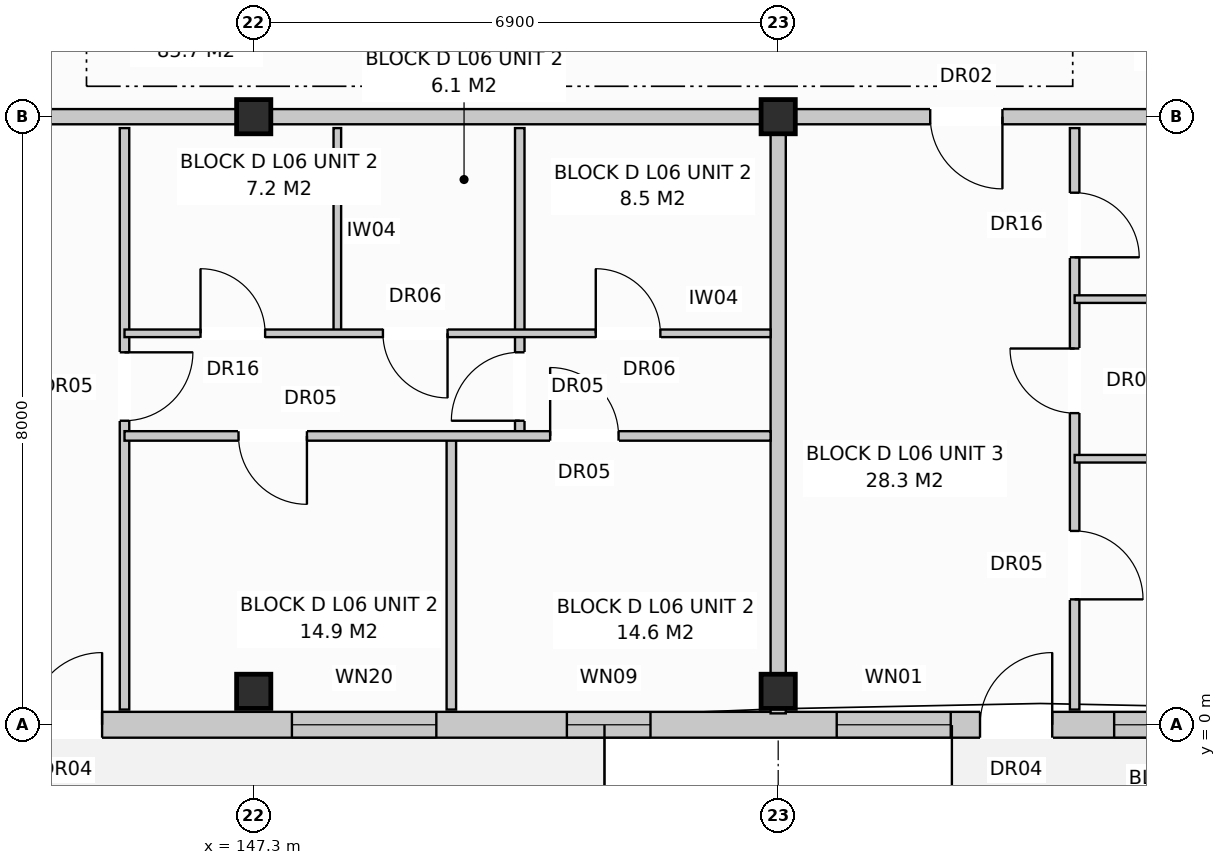
"""IFC4 building model, lengths in metres.
Left out: names, types, materials, properties, quantities, classifications, styles, units other than length and angle.
Written with IfcOpenShell. Run it as: python <this file> out.ifc"""

import sys

from ifc_helpers import new_model, si_unit, direction, frame, frame_2d, origin, origin_with_axes, origin_2d, place, context, subcontext, project, spatial, rectangle, extrude, element, fill, save


model = new_model("IFC4")
c1 = context("Model", 3, precision=1e-05, world=origin(), true_north=direction((0.0, 1.0)))
c2 = subcontext(c1, "Body", "Model", "MODEL_VIEW")
j1 = project(units=[si_unit("LENGTHUNIT", "METRE"), si_unit("PLANEANGLEUNIT", "RADIAN")], contexts=[c1])
p1 = place(None, origin())
s1 = spatial("IfcSite", under=j1, at=p1, CompositionType="ELEMENT")
p2 = place(p1, origin())
s2 = spatial("IfcBuilding", under=s1, at=p2, CompositionType="ELEMENT")
p3 = place(p2, frame((0.0, 0.0, 20.8)))
s3 = spatial("IfcBuildingStorey", under=s2, at=p3, CompositionType="ELEMENT", Elevation=20.8)
for number, where, z_axis, x_axis in (
    (1, (147.3, 0.44, 0.0), (0.0, 0.0, 1.0), (1.0, 0.0, 0.0)),
    (2, (147.3, 8.0, 0.0), (0.0, 0.0, 1.0), (1.0, 0.0, 0.0)),
    (3, (154.2, 0.44, 0.0), (0.0, 0.0, 1.0), (1.0, 0.0, 0.0)),
    (4, (154.2, 8.0, 0.0), (0.0, 0.0, 1.0), (1.0, 0.0, 0.0)),
):
    element("IfcColumn", number, at=place(p3, frame(where, z_axis=z_axis, x_axis=x_axis)), inside=s3, PredefinedType="COLUMN", context=c2, shape_type="SweptSolid", body=[
        extrude(rectangle(XDim=0.45, YDim=0.45, at=origin_2d()), origin(), (0.0, 0.0, 1.0), 3.2),
    ])
p4 = place(p3, frame((126.76, 0.0, 0.0), z_axis=(0.0, 0.0, 1.0), x_axis=(1.0, 0.0, 0.0)))
e5 = element("IfcWall", 5, at=p4, inside=s3, PredefinedType="STANDARD", context=c2, shape_type="SweptSolid", body=[
    extrude(rectangle(XDim=41.08, YDim=0.34, at=frame_2d((20.54, 0.0))), origin(), (0.0, 0.0, 1.0), 2.95),
])
p5 = place(p4, frame((2.795, 0.0, 0.0)))
e6 = element("IfcOpeningElement", 6, at=p5, cuts=e5, PredefinedType="OPENING", context=c2, shape_type="SweptSolid", body=[
    extrude(rectangle(XDim=0.95, YDim=2.1, at=frame_2d((0.475, 1.05))), frame((0.0, 0.182, 0.0), z_axis=(0.0, -1.0, 0.0), x_axis=(1.0, 0.0, 0.0)), (0.0, 0.0, 1.0), 0.364),
])
p6 = place(p4, frame((17.595, 0.0, 0.0)))
e7 = element("IfcOpeningElement", 7, at=p6, cuts=e5, PredefinedType="OPENING", context=c2, shape_type="SweptSolid", body=[
    extrude(rectangle(XDim=0.95, YDim=2.1, at=frame_2d((0.475, 1.05))), frame((0.0, 0.182, 0.0), z_axis=(0.0, -1.0, 0.0), x_axis=(1.0, 0.0, 0.0)), (0.0, 0.0, 1.0), 0.364),
])
p7 = place(p4, frame((30.095, 0.0, 0.0)))
e8 = element("IfcOpeningElement", 8, at=p7, cuts=e5, PredefinedType="OPENING", context=c2, shape_type="SweptSolid", body=[
    extrude(rectangle(XDim=0.95, YDim=2.1, at=frame_2d((0.475, 1.05))), frame((0.0, 0.182, 0.0), z_axis=(0.0, -1.0, 0.0), x_axis=(1.0, 0.0, 0.0)), (0.0, 0.0, 1.0), 0.364),
])
p8 = place(p4, frame((0.63, 0.0, 0.8)))
e9 = element("IfcOpeningElement", 9, at=p8, cuts=e5, PredefinedType="OPENING", context=c2, shape_type="SweptSolid", body=[
    extrude(rectangle(XDim=1.8, YDim=1.7, at=frame_2d((0.9, 0.85))), frame((0.0, 0.182, 0.0), z_axis=(0.0, -1.0, 0.0), x_axis=(1.0, 0.0, 0.0)), (0.0, 0.0, 1.0), 0.364),
])
p9 = place(p4, frame((4.36, 0.0, 0.72)))
e10 = element("IfcOpeningElement", 10, at=p9, cuts=e5, PredefinedType="OPENING", context=c2, shape_type="SweptSolid", body=[
    extrude(rectangle(XDim=1.9, YDim=1.85, at=frame_2d((0.95, 0.925))), frame((0.0, 0.182, 0.0), z_axis=(0.0, -1.0, 0.0), x_axis=(1.0, 0.0, 0.0)), (0.0, 0.0, 1.0), 0.364),
])
p10 = place(p4, frame((10.46, 0.0, 0.72)))
e11 = element("IfcOpeningElement", 11, at=p10, cuts=e5, PredefinedType="OPENING", context=c2, shape_type="SweptSolid", body=[
    extrude(rectangle(XDim=1.1, YDim=1.5, at=frame_2d((0.55, 0.75))), frame((0.0, 0.182, 0.0), z_axis=(0.0, -1.0, 0.0), x_axis=(1.0, 0.0, 0.0)), (0.0, 0.0, 1.0), 0.364),
])
p11 = place(p4, frame((15.76, 0.0, 0.72)))
e12 = element("IfcOpeningElement", 12, at=p11, cuts=e5, PredefinedType="OPENING", context=c2, shape_type="SweptSolid", body=[
    extrude(rectangle(XDim=1.1, YDim=1.5, at=frame_2d((0.55, 0.75))), frame((0.0, 0.182, 0.0), z_axis=(0.0, -1.0, 0.0), x_axis=(1.0, 0.0, 0.0)), (0.0, 0.0, 1.0), 0.364),
])
p12 = place(p4, frame((21.042, 0.0, 0.72)))
e13 = element("IfcOpeningElement", 13, at=p12, cuts=e5, PredefinedType="OPENING", context=c2, shape_type="SweptSolid", body=[
    extrude(rectangle(XDim=1.9, YDim=1.85, at=frame_2d((0.95, 0.925))), frame((0.0, 0.182, 0.0), z_axis=(0.0, -1.0, 0.0), x_axis=(1.0, 0.0, 0.0)), (0.0, 0.0, 1.0), 0.364),
])
p13 = place(p4, frame((24.66, 0.0, 0.72)))
e14 = element("IfcOpeningElement", 14, at=p13, cuts=e5, PredefinedType="OPENING", context=c2, shape_type="SweptSolid", body=[
    extrude(rectangle(XDim=1.1, YDim=1.5, at=frame_2d((0.55, 0.75))), frame((0.0, 0.182, 0.0), z_axis=(0.0, -1.0, 0.0), x_axis=(1.0, 0.0, 0.0)), (0.0, 0.0, 1.0), 0.364),
])
p14 = place(p4, frame((28.21, 0.0, 0.85)))
e15 = element("IfcOpeningElement", 15, at=p14, cuts=e5, PredefinedType="OPENING", context=c2, shape_type="SweptSolid", body=[
    extrude(rectangle(XDim=1.5, YDim=1.65, at=frame_2d((0.75, 0.825))), frame((0.0, 0.182, 0.0), z_axis=(0.0, -1.0, 0.0), x_axis=(1.0, 0.0, 0.0)), (0.0, 0.0, 1.0), 0.364),
])
p15 = place(p4, frame((31.86, 0.0, 0.72)))
e16 = element("IfcOpeningElement", 16, at=p15, cuts=e5, PredefinedType="OPENING", context=c2, shape_type="SweptSolid", body=[
    extrude(rectangle(XDim=1.9, YDim=1.85, at=frame_2d((0.95, 0.925))), frame((0.0, 0.182, 0.0), z_axis=(0.0, -1.0, 0.0), x_axis=(1.0, 0.0, 0.0)), (0.0, 0.0, 1.0), 0.364),
])
p16 = place(p4, frame((35.335, 0.0, 0.8)))
e17 = element("IfcOpeningElement", 17, at=p16, cuts=e5, PredefinedType="OPENING", context=c2, shape_type="SweptSolid", body=[
    extrude(rectangle(XDim=1.95, YDim=1.65, at=frame_2d((0.975, 0.825))), frame((0.0, 0.182, 0.0), z_axis=(0.0, -1.0, 0.0), x_axis=(1.0, 0.0, 0.0)), (0.0, 0.0, 1.0), 0.364),
])
p17 = place(p4, frame((38.65, 0.0, 0.8)))
e18 = element("IfcOpeningElement", 18, at=p17, cuts=e5, PredefinedType="OPENING", context=c2, shape_type="SweptSolid", body=[
    extrude(rectangle(XDim=1.8, YDim=1.7, at=frame_2d((0.9, 0.85))), frame((0.0, 0.182, 0.0), z_axis=(0.0, -1.0, 0.0), x_axis=(1.0, 0.0, 0.0)), (0.0, 0.0, 1.0), 0.364),
])
p18 = place(p3, frame((154.2, 7.85, 0.0), z_axis=(0.0, 0.0, 1.0), x_axis=(0.0, -1.0, 0.0)))
e19 = element("IfcWall", 19, at=p18, inside=s3, PredefinedType="PARTITIONING", context=c2, shape_type="SweptSolid", body=[
    extrude(rectangle(XDim=7.7, YDim=0.2, at=frame_2d((3.85, 0.0))), origin(), (0.0, 0.0, 1.0), 2.95),
])
p19 = place(p3, frame((140.4, 8.0, 0.0), z_axis=(0.0, 0.0, 1.0), x_axis=(1.0, 0.0, 0.0)))
e20 = element("IfcWall", 20, at=p19, inside=s3, PredefinedType="PARTITIONING", context=c2, shape_type="SweptSolid", body=[
    extrude(rectangle(XDim=13.8, YDim=0.2, at=frame_2d((6.9, 0.0))), origin(), (0.0, 0.0, 1.0), 2.39),
])
p20 = place(p19, frame((2.4, 0.0, 0.0)))
e21 = element("IfcOpeningElement", 21, at=p20, cuts=e20, PredefinedType="OPENING", context=c2, shape_type="SweptSolid", body=[
    extrude(rectangle(XDim=0.95, YDim=2.15, at=frame_2d((0.475, 1.075))), frame((0.0, 0.112, 0.0), z_axis=(0.0, -1.0, 0.0), x_axis=(1.0, 0.0, 0.0)), (0.0, 0.0, 1.0), 0.224),
])
p21 = place(p3, frame((145.6, 7.85, 0.0), z_axis=(0.0, 0.0, 1.0), x_axis=(0.0, -1.0, 0.0)))
e22 = element("IfcWall", 22, at=p21, inside=s3, PredefinedType="PARTITIONING", context=c2, shape_type="SweptSolid", body=[
    extrude(rectangle(XDim=7.65, YDim=0.125, at=frame_2d((3.825, 0.0))), origin(), (0.0, 0.0, 1.0), 2.95),
])
p22 = place(p21, frame((2.95, 0.0, 0.0)))
e23 = element("IfcOpeningElement", 23, at=p22, cuts=e22, PredefinedType="OPENING", context=c2, shape_type="SweptSolid", body=[
    extrude(rectangle(XDim=0.9, YDim=2.1, at=frame_2d((0.45, 1.05))), frame((0.0, 0.074, 0.0), z_axis=(0.0, -1.0, 0.0), x_axis=(1.0, 0.0, 0.0)), (0.0, 0.0, 1.0), 0.149),
])
p23 = place(p3, frame((148.4, 7.85, 0.0), z_axis=(0.0, 0.0, 1.0), x_axis=(0.0, -1.0, 0.0)))
e24 = element("IfcWall", 24, at=p23, inside=s3, PredefinedType="PARTITIONING", context=c2, shape_type="SweptSolid", body=[
    extrude(rectangle(XDim=2.7, YDim=0.1, at=frame_2d((1.35, 0.0))), origin(), (0.0, 0.0, 1.0), 2.95),
])
p24 = place(p3, frame((150.8, 7.85, 0.0), z_axis=(0.0, 0.0, 1.0), x_axis=(0.0, -1.0, 0.0)))
e25 = element("IfcWall", 25, at=p24, inside=s3, PredefinedType="PARTITIONING", context=c2, shape_type="SweptSolid", body=[
    extrude(rectangle(XDim=4.05, YDim=0.125, at=frame_2d((2.025, 0.0))), origin(), (0.0, 0.0, 1.0), 2.59),
])
p25 = place(p24, frame((2.95, 0.0, 0.0)))
e26 = element("IfcOpeningElement", 26, at=p25, cuts=e25, PredefinedType="OPENING", context=c2, shape_type="SweptSolid", body=[
    extrude(rectangle(XDim=0.9, YDim=2.1, at=frame_2d((0.45, 1.05))), frame((0.0, 0.074, 0.0), z_axis=(0.0, -1.0, 0.0), x_axis=(1.0, 0.0, 0.0)), (0.0, 0.0, 1.0), 0.149),
])
p26 = place(p3, frame((149.9, 3.8, 0.0), z_axis=(0.0, 0.0, 1.0), x_axis=(0.0, -1.0, 0.0)))
e27 = element("IfcWall", 27, at=p26, inside=s3, PredefinedType="PARTITIONING", context=c2, shape_type="SweptSolid", body=[
    extrude(rectangle(XDim=3.6, YDim=0.125, at=frame_2d((1.8, 0.0))), origin(), (0.0, 0.0, 1.0), 2.95),
])
p27 = place(p3, frame((145.6, 5.15, 0.0), z_axis=(0.0, 0.0, 1.0), x_axis=(1.0, 0.0, 0.0)))
e28 = element("IfcWall", 28, at=p27, inside=s3, PredefinedType="PARTITIONING", context=c2, shape_type="SweptSolid", body=[
    extrude(rectangle(XDim=8.5, YDim=0.1, at=frame_2d((4.25, 0.0))), origin(), (0.0, 0.0, 1.0), 2.95),
])
p28 = place(p27, frame((1.0, 0.0, 0.0)))
e29 = element("IfcOpeningElement", 29, at=p28, cuts=e28, PredefinedType="OPENING", context=c2, shape_type="SweptSolid", body=[
    extrude(rectangle(XDim=0.85, YDim=2.1, at=frame_2d((0.425, 1.05))), frame((0.0, 0.062, 0.0), z_axis=(0.0, -1.0, 0.0), x_axis=(1.0, 0.0, 0.0)), (0.0, 0.0, 1.0), 0.124),
])
p29 = place(p27, frame((3.4, 0.0, 0.0)))
e30 = element("IfcOpeningElement", 30, at=p29, cuts=e28, PredefinedType="OPENING", context=c2, shape_type="SweptSolid", body=[
    extrude(rectangle(XDim=0.85, YDim=2.05, at=frame_2d((0.425, 1.025))), frame((0.0, 0.062, 0.0), z_axis=(0.0, -1.0, 0.0), x_axis=(1.0, 0.0, 0.0)), (0.0, 0.0, 1.0), 0.124),
])
p30 = place(p27, frame((6.2, 0.0, 0.0)))
e31 = element("IfcOpeningElement", 31, at=p30, cuts=e28, PredefinedType="OPENING", context=c2, shape_type="SweptSolid", body=[
    extrude(rectangle(XDim=0.85, YDim=2.05, at=frame_2d((0.425, 1.025))), frame((0.0, 0.062, 0.0), z_axis=(0.0, -1.0, 0.0), x_axis=(1.0, 0.0, 0.0)), (0.0, 0.0, 1.0), 0.124),
])
p31 = place(p3, frame((145.6, 3.8, 0.0), z_axis=(0.0, 0.0, 1.0), x_axis=(1.0, 0.0, 0.0)))
e32 = element("IfcWall", 32, at=p31, inside=s3, PredefinedType="PARTITIONING", context=c2, shape_type="SweptSolid", body=[
    extrude(rectangle(XDim=8.5, YDim=0.125, at=frame_2d((4.25, 0.0))), origin(), (0.0, 0.0, 1.0), 2.95),
])
p32 = place(p31, frame((1.5, 0.0, 0.0)))
e33 = element("IfcOpeningElement", 33, at=p32, cuts=e32, PredefinedType="OPENING", context=c2, shape_type="SweptSolid", body=[
    extrude(rectangle(XDim=0.9, YDim=2.1, at=frame_2d((0.45, 1.05))), frame((0.0, 0.074, 0.0), z_axis=(0.0, -1.0, 0.0), x_axis=(1.0, 0.0, 0.0)), (0.0, 0.0, 1.0), 0.149),
])
p33 = place(p31, frame((5.6, 0.0, 0.0)))
e34 = element("IfcOpeningElement", 34, at=p33, cuts=e32, PredefinedType="OPENING", context=c2, shape_type="SweptSolid", body=[
    extrude(rectangle(XDim=0.9, YDim=2.1, at=frame_2d((0.45, 1.05))), frame((0.0, 0.074, 0.0), z_axis=(0.0, -1.0, 0.0), x_axis=(1.0, 0.0, 0.0)), (0.0, 0.0, 1.0), 0.149),
])
p34 = place(p3, frame((154.2, 8.0, 0.0), z_axis=(0.0, 0.0, 1.0), x_axis=(1.0, 0.0, 0.0)))
e35 = element("IfcWall", 35, at=p34, inside=s3, PredefinedType="PARTITIONING", context=c2, shape_type="SweptSolid", body=[
    extrude(rectangle(XDim=6.9, YDim=0.2, at=frame_2d((3.45, 0.0))), origin(), (0.0, 0.0, 1.0), 2.39),
])
p35 = place(p34, frame((2.0, 0.0, 0.0)))
e36 = element("IfcOpeningElement", 36, at=p35, cuts=e35, PredefinedType="OPENING", context=c2, shape_type="SweptSolid", body=[
    extrude(rectangle(XDim=0.95, YDim=2.15, at=frame_2d((0.475, 1.075))), frame((0.0, 0.112, 0.0), z_axis=(0.0, -1.0, 0.0), x_axis=(1.0, 0.0, 0.0)), (0.0, 0.0, 1.0), 0.224),
])
p36 = place(p3, frame((158.1, 7.85, 0.0), z_axis=(0.0, 0.0, 1.0), x_axis=(0.0, -1.0, 0.0)))
e37 = element("IfcWall", 37, at=p36, inside=s3, PredefinedType="PARTITIONING", context=c2, shape_type="SweptSolid", body=[
    extrude(rectangle(XDim=7.65, YDim=0.125, at=frame_2d((3.825, 0.0))), origin(), (0.0, 0.0, 1.0), 2.95),
])
p37 = place(p36, frame((0.85, 0.0, 0.0)))
e38 = element("IfcOpeningElement", 38, at=p37, cuts=e37, PredefinedType="OPENING", context=c2, shape_type="SweptSolid", body=[
    extrude(rectangle(XDim=0.85, YDim=2.1, at=frame_2d((0.425, 1.05))), frame((0.0, 0.074, 0.0), z_axis=(0.0, -1.0, 0.0), x_axis=(1.0, 0.0, 0.0)), (0.0, 0.0, 1.0), 0.149),
])
p38 = place(p36, frame((2.9, 0.0, 0.0)))
e39 = element("IfcOpeningElement", 39, at=p38, cuts=e37, PredefinedType="OPENING", context=c2, shape_type="SweptSolid", body=[
    extrude(rectangle(XDim=0.85, YDim=2.05, at=frame_2d((0.425, 1.025))), frame((0.0, 0.074, 0.0), z_axis=(0.0, -1.0, 0.0), x_axis=(1.0, 0.0, 0.0)), (0.0, 0.0, 1.0), 0.149),
])
p39 = place(p36, frame((5.3, 0.0, 0.0)))
e40 = element("IfcOpeningElement", 40, at=p39, cuts=e37, PredefinedType="OPENING", context=c2, shape_type="SweptSolid", body=[
    extrude(rectangle(XDim=0.9, YDim=2.1, at=frame_2d((0.45, 1.05))), frame((0.0, 0.074, 0.0), z_axis=(0.0, -1.0, 0.0), x_axis=(1.0, 0.0, 0.0)), (0.0, 0.0, 1.0), 0.149),
])
for number, where, z_axis, x_axis in (
    (41, (158.1, 5.6, 0.0), (0.0, 0.0, 1.0), (1.0, 0.0, 0.0)),
    (42, (158.1, 3.5, 0.0), (0.0, 0.0, 1.0), (1.0, 0.0, 0.0)),
):
    element("IfcWall", number, at=place(p3, frame(where, z_axis=z_axis, x_axis=x_axis)), inside=s3, PredefinedType="PARTITIONING", context=c2, shape_type="SweptSolid", body=[
        extrude(rectangle(XDim=2.9, YDim=0.1, at=frame_2d((1.45, 0.0))), origin(), (0.0, 0.0, 1.0), 2.95),
    ])
p40 = place(p6, origin_with_axes())
e43 = element("IfcDoor", 43, at=p40, inside=s3, OperationType="SINGLE_SWING_RIGHT", PredefinedType="DOOR", context=c2, shape_type="SweptSolid", body=[
    extrude(rectangle(XDim=0.95, YDim=2.1, at=frame_2d((0.475, 1.05))), frame((0.0, 0.025, 0.0), z_axis=(0.0, -1.0, 0.0), x_axis=(1.0, 0.0, 0.0)), (0.0, 0.0, 1.0), 0.05),
])
fill(e7, e43)
p41 = place(p7, origin_with_axes())
e44 = element("IfcDoor", 44, at=p41, inside=s3, OperationType="SINGLE_SWING_RIGHT", PredefinedType="DOOR", context=c2, shape_type="SweptSolid", body=[
    extrude(rectangle(XDim=0.95, YDim=2.1, at=frame_2d((0.475, 1.05))), frame((0.0, 0.025, 0.0), z_axis=(0.0, -1.0, 0.0), x_axis=(1.0, 0.0, 0.0)), (0.0, 0.0, 1.0), 0.05),
])
fill(e8, e44)
p42 = place(p12, origin_with_axes())
e45 = element("IfcWindow", 45, at=p42, inside=s3, PartitioningType="SINGLE_PANEL", PredefinedType="WINDOW", context=c2, shape_type="SweptSolid", body=[
    extrude(rectangle(XDim=1.9, YDim=1.85, at=frame_2d((0.95, 0.925))), frame((0.0, 0.03, 0.0), z_axis=(0.0, -1.0, 0.0), x_axis=(1.0, 0.0, 0.0)), (0.0, 0.0, 1.0), 0.06),
])
fill(e13, e45)
p43 = place(p13, origin_with_axes())
e46 = element("IfcWindow", 46, at=p43, inside=s3, PartitioningType="SINGLE_PANEL", PredefinedType="WINDOW", context=c2, shape_type="SweptSolid", body=[
    extrude(rectangle(XDim=1.1, YDim=1.5, at=frame_2d((0.55, 0.75))), frame((0.0, 0.03, 0.0), z_axis=(0.0, -1.0, 0.0), x_axis=(1.0, 0.0, 0.0)), (0.0, 0.0, 1.0), 0.06),
])
fill(e14, e46)
p44 = place(p14, origin_with_axes())
e47 = element("IfcWindow", 47, at=p44, inside=s3, PartitioningType="SINGLE_PANEL", PredefinedType="WINDOW", context=c2, shape_type="SweptSolid", body=[
    extrude(rectangle(XDim=1.5, YDim=1.65, at=frame_2d((0.75, 0.825))), frame((0.0, 0.03, 0.0), z_axis=(0.0, -1.0, 0.0), x_axis=(1.0, 0.0, 0.0)), (0.0, 0.0, 1.0), 0.06),
])
fill(e15, e47)
p45 = place(p15, origin_with_axes())
e48 = element("IfcWindow", 48, at=p45, inside=s3, PartitioningType="SINGLE_PANEL", PredefinedType="WINDOW", context=c2, shape_type="SweptSolid", body=[
    extrude(rectangle(XDim=1.9, YDim=1.85, at=frame_2d((0.95, 0.925))), frame((0.0, 0.03, 0.0), z_axis=(0.0, -1.0, 0.0), x_axis=(1.0, 0.0, 0.0)), (0.0, 0.0, 1.0), 0.06),
])
fill(e16, e48)
p46 = place(p22, origin_with_axes())
e49 = element("IfcDoor", 49, at=p46, inside=s3, OperationType="SINGLE_SWING_LEFT", PredefinedType="DOOR", context=c2, shape_type="SweptSolid", body=[
    extrude(rectangle(XDim=0.9, YDim=2.1, at=frame_2d((0.45, 1.05))), frame((0.0, 0.025, 0.0), z_axis=(0.0, -1.0, 0.0), x_axis=(1.0, 0.0, 0.0)), (0.0, 0.0, 1.0), 0.05),
])
fill(e23, e49)
p47 = place(p25, frame((0.9, 0.0, 0.0), z_axis=(0.0, 0.0, 1.0), x_axis=(-1.0, 0.0, 0.0)))
e50 = element("IfcDoor", 50, at=p47, inside=s3, OperationType="SINGLE_SWING_RIGHT", PredefinedType="DOOR", context=c2, shape_type="SweptSolid", body=[
    extrude(rectangle(XDim=0.9, YDim=2.1, at=frame_2d((0.45, 1.05))), frame((0.0, 0.025, 0.0), z_axis=(0.0, -1.0, 0.0), x_axis=(1.0, 0.0, 0.0)), (0.0, 0.0, 1.0), 0.05),
])
fill(e26, e50)
p48 = place(p28, origin_with_axes())
e51 = element("IfcDoor", 51, at=p48, inside=s3, OperationType="SINGLE_SWING_LEFT", PredefinedType="DOOR", context=c2, shape_type="SweptSolid", body=[
    extrude(rectangle(XDim=0.85, YDim=2.1, at=frame_2d((0.425, 1.05))), frame((0.0, 0.025, 0.0), z_axis=(0.0, -1.0, 0.0), x_axis=(1.0, 0.0, 0.0)), (0.0, 0.0, 1.0), 0.05),
])
fill(e29, e51)
p49 = place(p29, frame((0.85, 0.0, 0.0), z_axis=(0.0, 0.0, 1.0), x_axis=(-1.0, 0.0, 0.0)))
e52 = element("IfcDoor", 52, at=p49, inside=s3, OperationType="SINGLE_SWING_RIGHT", PredefinedType="DOOR", context=c2, shape_type="SweptSolid", body=[
    extrude(rectangle(XDim=0.85, YDim=2.05, at=frame_2d((0.425, 1.025))), frame((0.0, 0.025, 0.0), z_axis=(0.0, -1.0, 0.0), x_axis=(1.0, 0.0, 0.0)), (0.0, 0.0, 1.0), 0.05),
])
fill(e30, e52)
p50 = place(p30, origin_with_axes())
e53 = element("IfcDoor", 53, at=p50, inside=s3, OperationType="SINGLE_SWING_LEFT", PredefinedType="DOOR", context=c2, shape_type="SweptSolid", body=[
    extrude(rectangle(XDim=0.85, YDim=2.05, at=frame_2d((0.425, 1.025))), frame((0.0, 0.025, 0.0), z_axis=(0.0, -1.0, 0.0), x_axis=(1.0, 0.0, 0.0)), (0.0, 0.0, 1.0), 0.05),
])
fill(e31, e53)
p51 = place(p32, frame((0.9, 0.0, 0.0), z_axis=(0.0, 0.0, 1.0), x_axis=(-1.0, 0.0, 0.0)))
e54 = element("IfcDoor", 54, at=p51, inside=s3, OperationType="SINGLE_SWING_RIGHT", PredefinedType="DOOR", context=c2, shape_type="SweptSolid", body=[
    extrude(rectangle(XDim=0.9, YDim=2.1, at=frame_2d((0.45, 1.05))), frame((0.0, 0.025, 0.0), z_axis=(0.0, -1.0, 0.0), x_axis=(1.0, 0.0, 0.0)), (0.0, 0.0, 1.0), 0.05),
])
fill(e33, e54)
p52 = place(p33, origin_with_axes())
e55 = element("IfcDoor", 55, at=p52, inside=s3, OperationType="SINGLE_SWING_LEFT", PredefinedType="DOOR", context=c2, shape_type="SweptSolid", body=[
    extrude(rectangle(XDim=0.9, YDim=2.1, at=frame_2d((0.45, 1.05))), frame((0.0, 0.025, 0.0), z_axis=(0.0, -1.0, 0.0), x_axis=(1.0, 0.0, 0.0)), (0.0, 0.0, 1.0), 0.05),
])
fill(e34, e55)
p53 = place(p35, frame((0.95, 0.0, 0.0), z_axis=(0.0, 0.0, 1.0), x_axis=(-1.0, 0.0, 0.0)))
e56 = element("IfcDoor", 56, at=p53, inside=s3, OperationType="SINGLE_SWING_RIGHT", PredefinedType="DOOR", context=c2, shape_type="SweptSolid", body=[
    extrude(rectangle(XDim=0.95, YDim=2.15, at=frame_2d((0.475, 1.075))), frame((0.0, 0.025, 0.0), z_axis=(0.0, -1.0, 0.0), x_axis=(1.0, 0.0, 0.0)), (0.0, 0.0, 1.0), 0.05),
])
fill(e36, e56)
p54 = place(p37, origin_with_axes())
e57 = element("IfcDoor", 57, at=p54, inside=s3, OperationType="SINGLE_SWING_RIGHT", PredefinedType="DOOR", context=c2, shape_type="SweptSolid", body=[
    extrude(rectangle(XDim=0.85, YDim=2.1, at=frame_2d((0.425, 1.05))), frame((0.0, 0.025, 0.0), z_axis=(0.0, -1.0, 0.0), x_axis=(1.0, 0.0, 0.0)), (0.0, 0.0, 1.0), 0.05),
])
fill(e38, e57)
p55 = place(p38, frame((0.85, 0.0, 0.0), z_axis=(0.0, 0.0, 1.0), x_axis=(-1.0, 0.0, 0.0)))
e58 = element("IfcDoor", 58, at=p55, inside=s3, OperationType="SINGLE_SWING_LEFT", PredefinedType="DOOR", context=c2, shape_type="SweptSolid", body=[
    extrude(rectangle(XDim=0.85, YDim=2.05, at=frame_2d((0.425, 1.025))), frame((0.0, 0.025, 0.0), z_axis=(0.0, -1.0, 0.0), x_axis=(1.0, 0.0, 0.0)), (0.0, 0.0, 1.0), 0.05),
])
fill(e39, e58)
p56 = place(p39, origin_with_axes())
e59 = element("IfcDoor", 59, at=p56, inside=s3, OperationType="SINGLE_SWING_RIGHT", PredefinedType="DOOR", context=c2, shape_type="SweptSolid", body=[
    extrude(rectangle(XDim=0.9, YDim=2.1, at=frame_2d((0.45, 1.05))), frame((0.0, 0.025, 0.0), z_axis=(0.0, -1.0, 0.0), x_axis=(1.0, 0.0, 0.0)), (0.0, 0.0, 1.0), 0.05),
])
fill(e40, e59)
save(model, sys.argv[1])
